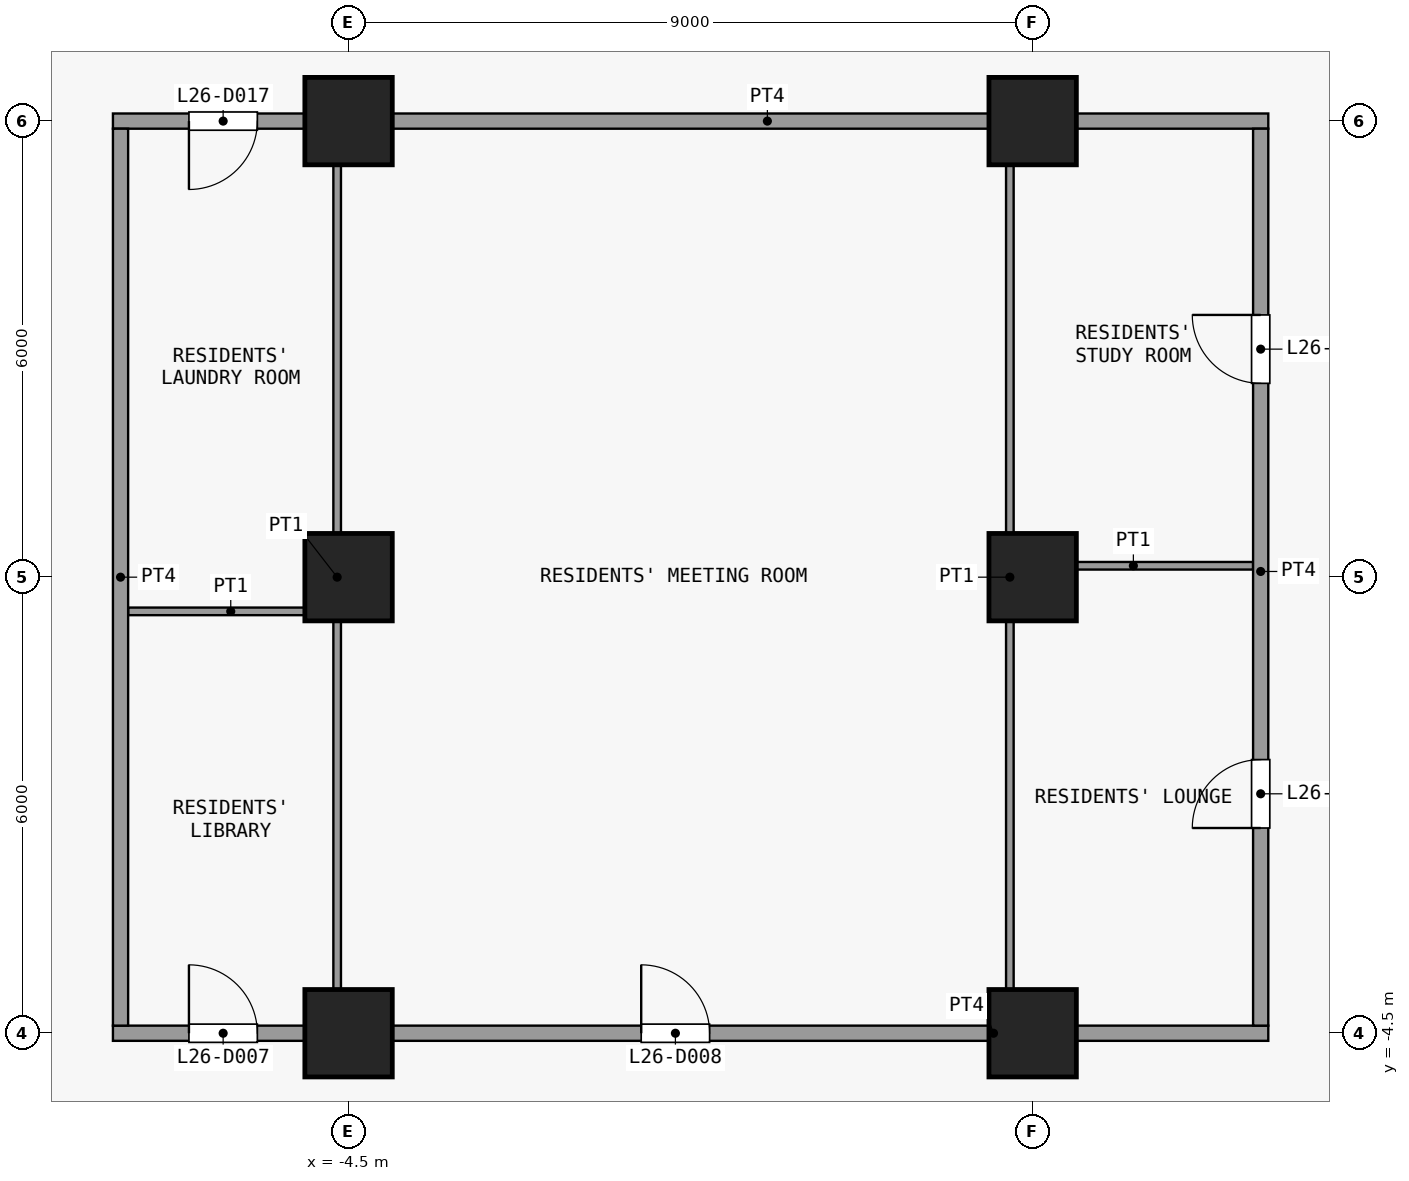
"""IFC4 building model, lengths in metres.
Left out: names, types, materials, properties, quantities, classifications, styles, units other than length and angle.
Written with IfcOpenShell. Run it as: python <this file> out.ifc"""

import sys

from ifc_helpers import new_model, si_unit, direction, frame, frame_2d, origin, origin_2d, place, context, subcontext, project, spatial, rectangle, extrude, element, fill, save


model = new_model("IFC4")
c1 = context("Model", 3, precision=1e-05, world=origin(), true_north=direction((0.0, 1.0)))
c2 = subcontext(c1, "Body", "Model", "MODEL_VIEW")
j1 = project(units=[si_unit("LENGTHUNIT", "METRE"), si_unit("PLANEANGLEUNIT", "RADIAN")], contexts=[c1])
p1 = place(None, origin())
s1 = spatial("IfcSite", under=j1, at=p1, CompositionType="ELEMENT")
p2 = place(p1, origin())
s2 = spatial("IfcBuilding", under=s1, at=p2, CompositionType="ELEMENT")
p3 = place(p2, frame((0.0, 0.0, 106.3)))
s3 = spatial("IfcBuildingStorey", under=s2, at=p3, CompositionType="ELEMENT", Elevation=106.3)
for number, where, z_axis, x_axis in (
    (1, (-4.5, -4.5, 0.0), (0.0, 0.0, 1.0), (1.0, 0.0, 0.0)),
    (2, (-4.5, 1.5, 0.0), (0.0, 0.0, 1.0), (1.0, 0.0, 0.0)),
    (3, (-4.5, 7.5, 0.0), (0.0, 0.0, 1.0), (1.0, 0.0, 0.0)),
    (4, (4.5, -4.5, 0.0), (0.0, 0.0, 1.0), (1.0, 0.0, 0.0)),
    (5, (4.5, 1.5, 0.0), (0.0, 0.0, 1.0), (1.0, 0.0, 0.0)),
    (6, (4.5, 7.5, 0.0), (0.0, 0.0, 1.0), (1.0, 0.0, 0.0)),
):
    element("IfcColumn", number, at=place(p3, frame(where, z_axis=z_axis, x_axis=x_axis)), inside=s3, PredefinedType="COLUMN", context=c2, shape_type="SweptSolid", body=[
        extrude(rectangle(XDim=1.15, YDim=1.15, at=origin_2d()), origin(), (0.0, 0.0, 1.0), 3.6),
    ])
p4 = place(p3, frame((-7.6, -4.5, 0.0), z_axis=(0.0, 0.0, 1.0), x_axis=(1.0, 0.0, 0.0)))
e7 = element("IfcWall", 7, at=p4, inside=s3, PredefinedType="PARTITIONING", context=c2, shape_type="SweptSolid", body=[
    extrude(rectangle(XDim=15.2, YDim=0.2, at=frame_2d((7.6, 0.0))), origin(), (0.0, 0.0, 1.0), 3.3),
])
p5 = place(p4, frame((1.0, 0.0, 0.0)))
e8 = element("IfcOpeningElement", 8, at=p5, cuts=e7, PredefinedType="OPENING", context=c2, shape_type="SweptSolid", body=[
    extrude(rectangle(XDim=0.9, YDim=2.1, at=frame_2d((0.45, 1.05))), frame((0.0, 0.11, 0.0), z_axis=(0.0, -1.0, 0.0), x_axis=(1.0, 0.0, 0.0)), (0.0, 0.0, 1.0), 0.22),
])
p6 = place(p4, frame((6.95, 0.0, 0.0)))
e9 = element("IfcOpeningElement", 9, at=p6, cuts=e7, PredefinedType="OPENING", context=c2, shape_type="SweptSolid", body=[
    extrude(rectangle(XDim=0.9, YDim=2.1, at=frame_2d((0.45, 1.05))), frame((0.0, 0.11, 0.0), z_axis=(0.0, -1.0, 0.0), x_axis=(1.0, 0.0, 0.0)), (0.0, 0.0, 1.0), 0.22),
])
p7 = place(p3, frame((-7.4, 1.05, 0.0), z_axis=(0.0, 0.0, 1.0), x_axis=(1.0, 0.0, 0.0)))
e10 = element("IfcWall", 10, at=p7, inside=s3, PredefinedType="PARTITIONING", context=c2, shape_type="SweptSolid", body=[
    extrude(rectangle(XDim=2.7, YDim=0.1, at=frame_2d((1.35, 0.0))), origin(), (0.0, 0.0, 1.0), 3.3),
])
p8 = place(p3, frame((4.25, 1.65, 0.0), z_axis=(0.0, 0.0, 1.0), x_axis=(1.0, 0.0, 0.0)))
e11 = element("IfcWall", 11, at=p8, inside=s3, PredefinedType="PARTITIONING", context=c2, shape_type="SweptSolid", body=[
    extrude(rectangle(XDim=3.15, YDim=0.1, at=frame_2d((1.575, 0.0))), origin(), (0.0, 0.0, 1.0), 3.3),
])
p9 = place(p3, frame((-7.6, 7.5, 0.0), z_axis=(0.0, 0.0, 1.0), x_axis=(1.0, 0.0, 0.0)))
e12 = element("IfcWall", 12, at=p9, inside=s3, PredefinedType="PARTITIONING", context=c2, shape_type="SweptSolid", body=[
    extrude(rectangle(XDim=15.2, YDim=0.2, at=frame_2d((7.6, 0.0))), origin(), (0.0, 0.0, 1.0), 3.3),
])
p10 = place(p9, frame((1.0, 0.0, 0.0)))
e13 = element("IfcOpeningElement", 13, at=p10, cuts=e12, PredefinedType="OPENING", context=c2, shape_type="SweptSolid", body=[
    extrude(rectangle(XDim=0.9, YDim=2.1, at=frame_2d((0.45, 1.05))), frame((0.0, 0.11, 0.0), z_axis=(0.0, -1.0, 0.0), x_axis=(1.0, 0.0, 0.0)), (0.0, 0.0, 1.0), 0.22),
])
p11 = place(p3, frame((-7.5, -4.4, 0.0), z_axis=(0.0, 0.0, 1.0), x_axis=(0.0, 1.0, 0.0)))
e14 = element("IfcWall", 14, at=p11, inside=s3, PredefinedType="PARTITIONING", context=c2, shape_type="SweptSolid", body=[
    extrude(rectangle(XDim=11.8, YDim=0.2, at=frame_2d((5.9, 0.0))), origin(), (0.0, 0.0, 1.0), 3.3),
])
for number, where, z_axis, x_axis in (
    (15, (-4.65, -4.4, 0.0), (0.0, 0.0, 1.0), (0.0, 1.0, 0.0)),
    (16, (4.2, -4.4, 0.0), (0.0, 0.0, 1.0), (0.0, 1.0, 0.0)),
):
    element("IfcWall", number, at=place(p3, frame(where, z_axis=z_axis, x_axis=x_axis)), inside=s3, PredefinedType="PARTITIONING", context=c2, shape_type="SweptSolid", body=[
        extrude(rectangle(XDim=11.8, YDim=0.1, at=frame_2d((5.9, 0.0))), origin(), (0.0, 0.0, 1.0), 3.3),
    ])
p12 = place(p3, frame((7.5, -4.4, 0.0), z_axis=(0.0, 0.0, 1.0), x_axis=(0.0, 1.0, 0.0)))
e17 = element("IfcWall", 17, at=p12, inside=s3, PredefinedType="PARTITIONING", context=c2, shape_type="SweptSolid", body=[
    extrude(rectangle(XDim=11.8, YDim=0.2, at=frame_2d((5.9, 0.0))), origin(), (0.0, 0.0, 1.0), 3.3),
])
p13 = place(p12, frame((2.6, 0.0, 0.0)))
e18 = element("IfcOpeningElement", 18, at=p13, cuts=e17, PredefinedType="OPENING", context=c2, shape_type="SweptSolid", body=[
    extrude(rectangle(XDim=0.9, YDim=2.1, at=frame_2d((0.45, 1.05))), frame((0.0, 0.11, 0.0), z_axis=(0.0, -1.0, 0.0), x_axis=(1.0, 0.0, 0.0)), (0.0, 0.0, 1.0), 0.22),
])
p14 = place(p12, frame((8.45, 0.0, 0.0)))
e19 = element("IfcOpeningElement", 19, at=p14, cuts=e17, PredefinedType="OPENING", context=c2, shape_type="SweptSolid", body=[
    extrude(rectangle(XDim=0.9, YDim=2.1, at=frame_2d((0.45, 1.05))), frame((0.0, 0.11, 0.0), z_axis=(0.0, -1.0, 0.0), x_axis=(1.0, 0.0, 0.0)), (0.0, 0.0, 1.0), 0.22),
])
p15 = place(p5, origin())
e20 = element("IfcDoor", 20, at=p15, inside=s3, OperationType="SINGLE_SWING_RIGHT", PredefinedType="DOOR", context=c2, shape_type="SweptSolid", body=[
    extrude(rectangle(XDim=0.9, YDim=2.1, at=frame_2d((0.45, 1.05))), frame((0.0, 0.025, 0.0), z_axis=(0.0, -1.0, 0.0), x_axis=(1.0, 0.0, 0.0)), (0.0, 0.0, 1.0), 0.05),
])
fill(e8, e20)
p16 = place(p6, origin())
e21 = element("IfcDoor", 21, at=p16, inside=s3, OperationType="SINGLE_SWING_RIGHT", PredefinedType="DOOR", context=c2, shape_type="SweptSolid", body=[
    extrude(rectangle(XDim=0.9, YDim=2.1, at=frame_2d((0.45, 1.05))), frame((0.0, 0.025, 0.0), z_axis=(0.0, -1.0, 0.0), x_axis=(1.0, 0.0, 0.0)), (0.0, 0.0, 1.0), 0.05),
])
fill(e9, e21)
p17 = place(p10, origin())
e22 = element("IfcDoor", 22, at=p17, inside=s3, OperationType="SINGLE_SWING_LEFT", PredefinedType="DOOR", context=c2, shape_type="SweptSolid", body=[
    extrude(rectangle(XDim=0.9, YDim=2.1, at=frame_2d((0.45, 1.05))), frame((0.0, 0.025, 0.0), z_axis=(0.0, -1.0, 0.0), x_axis=(1.0, 0.0, 0.0)), (0.0, 0.0, 1.0), 0.05),
])
fill(e13, e22)
p18 = place(p13, origin())
e23 = element("IfcDoor", 23, at=p18, inside=s3, OperationType="SINGLE_SWING_RIGHT", PredefinedType="DOOR", context=c2, shape_type="SweptSolid", body=[
    extrude(rectangle(XDim=0.9, YDim=2.1, at=frame_2d((0.45, 1.05))), frame((0.0, 0.025, 0.0), z_axis=(0.0, -1.0, 0.0), x_axis=(1.0, 0.0, 0.0)), (0.0, 0.0, 1.0), 0.05),
])
fill(e18, e23)
p19 = place(p14, origin())
e24 = element("IfcDoor", 24, at=p19, inside=s3, OperationType="SINGLE_SWING_LEFT", PredefinedType="DOOR", context=c2, shape_type="SweptSolid", body=[
    extrude(rectangle(XDim=0.9, YDim=2.1, at=frame_2d((0.45, 1.05))), frame((0.0, 0.025, 0.0), z_axis=(0.0, -1.0, 0.0), x_axis=(1.0, 0.0, 0.0)), (0.0, 0.0, 1.0), 0.05),
])
fill(e19, e24)
save(model, sys.argv[1])
